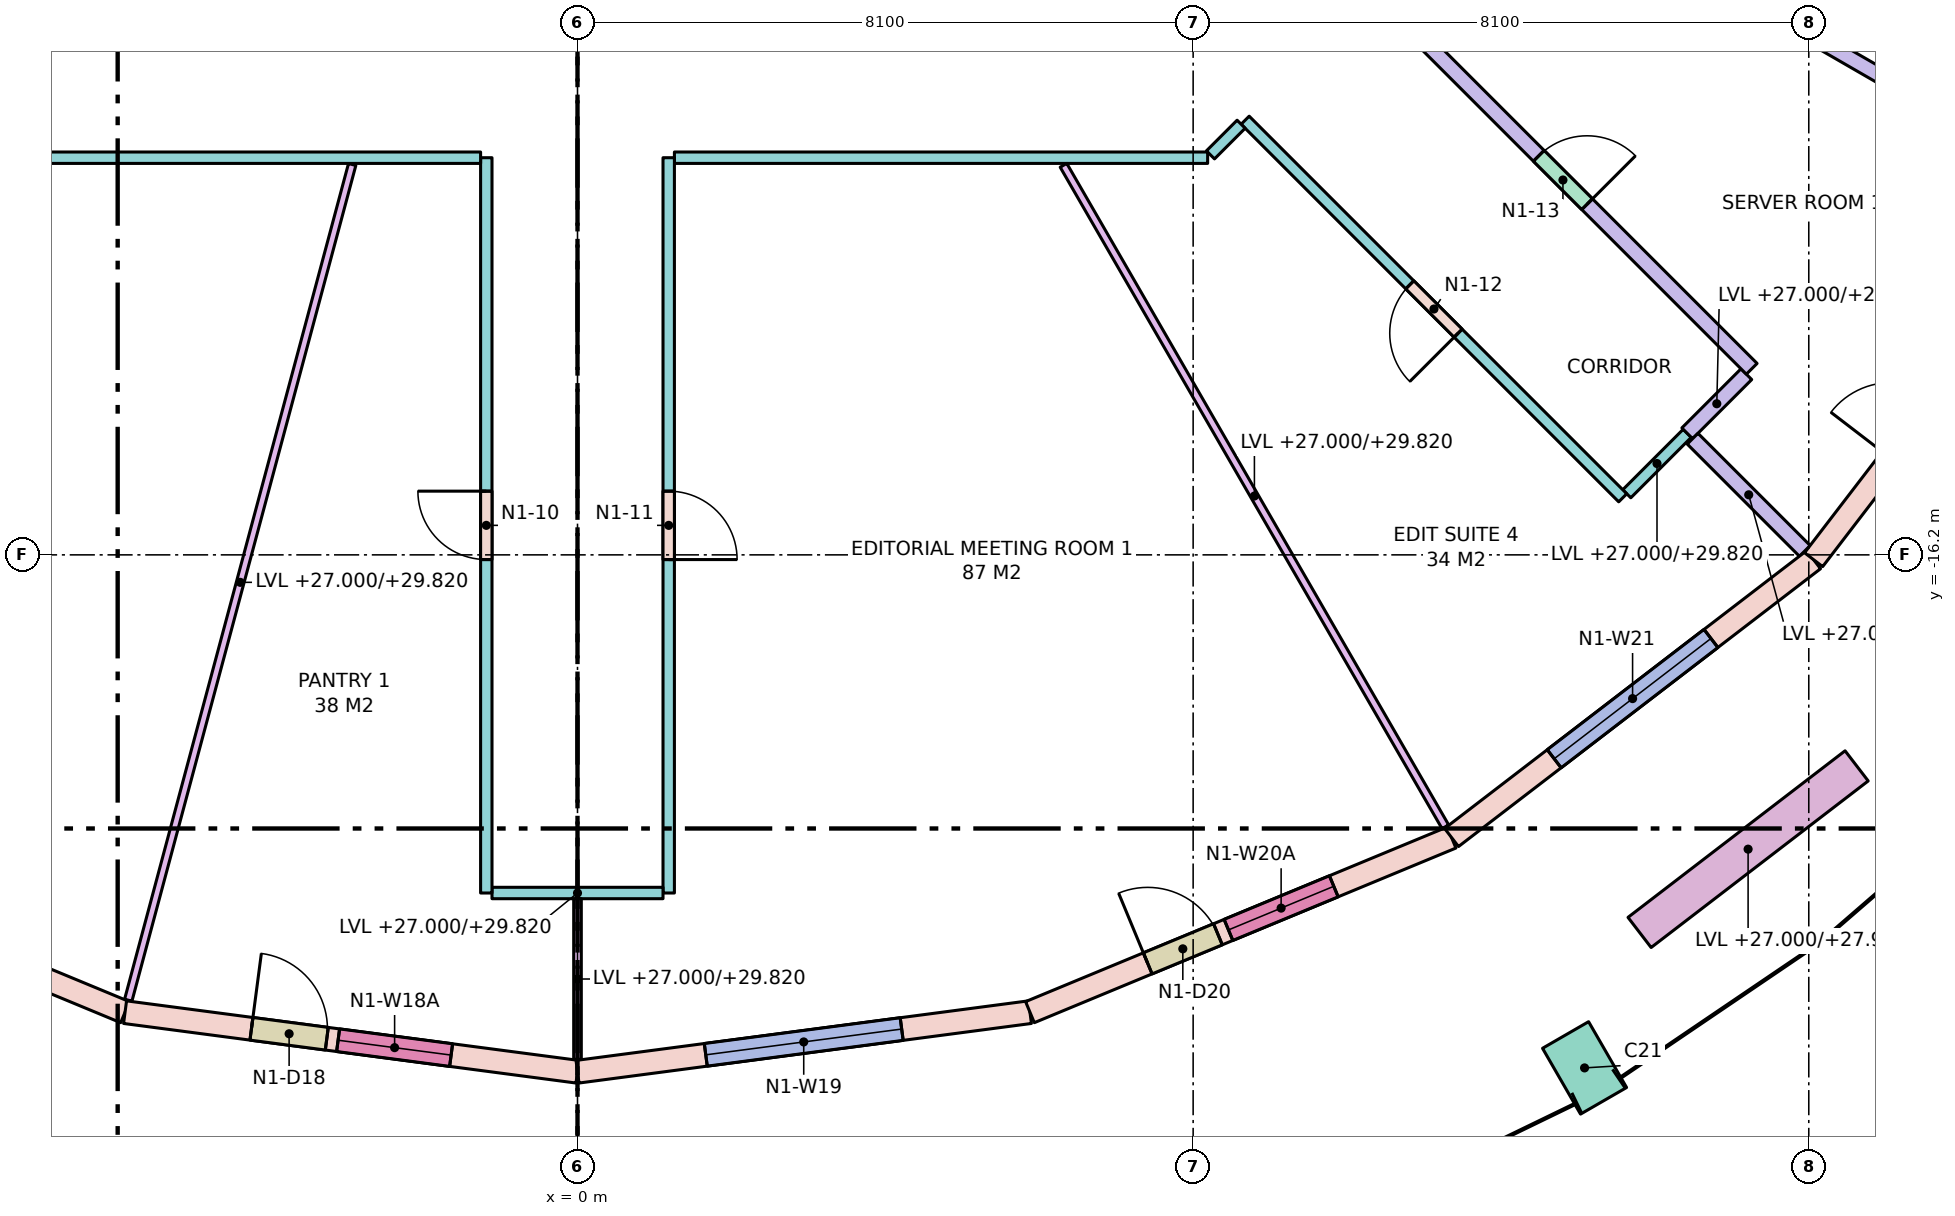
"""IFC4 building model, lengths in metres.
Left out: names, types, materials, properties, quantities, classifications, styles, units other than length and angle.
Written with IfcOpenShell. Run it as: python <this file> out.ifc"""

import sys

from ifc_helpers import new_model, si_unit, direction, frame, frame_2d, origin, origin_2d, place, context, subcontext, project, spatial, rectangle, extrude, element, fill, save


model = new_model("IFC4")
c1 = context("Model", 3, precision=1e-05, world=origin(), true_north=direction((0.0, 1.0)))
c2 = subcontext(c1, "Body", "Model", "MODEL_VIEW")
j1 = project(units=[si_unit("LENGTHUNIT", "METRE"), si_unit("PLANEANGLEUNIT", "RADIAN")], contexts=[c1])
p1 = place(None, origin())
s1 = spatial("IfcSite", under=j1, at=p1, CompositionType="ELEMENT")
p2 = place(p1, origin())
s2 = spatial("IfcBuilding", under=s1, at=p2, CompositionType="ELEMENT")
p3 = place(p2, frame((0.0, 0.0, 27.0)))
s3 = spatial("IfcBuildingStorey", under=s2, at=p3, CompositionType="ELEMENT", Elevation=27.0)
p4 = place(p3, frame((13.25, -22.95, 0.0), z_axis=(0.0, 0.0, 1.0), x_axis=(0.866025403784, 0.5, 0.0)))
e1 = element("IfcColumn", 1, at=p4, inside=s3, PredefinedType="COLUMN", context=c2, shape_type="SweptSolid", body=[
    extrude(rectangle(XDim=0.7, YDim=1.0, at=origin_2d()), origin(), (0.0, 0.0, 1.0), 4.0),
])
p5 = place(p3, frame((-11.5, -19.919, 0.0), z_axis=(0.0, 0.0, 1.0), x_axis=(0.923884511653, -0.382671411433, 0.0)))
e2 = element("IfcWall", 2, at=p5, inside=s3, PredefinedType="STANDARD", context=c2, shape_type="SweptSolid", body=[
    extrude(rectangle(XDim=6.004, YDim=0.3, at=frame_2d((3.002, 0.0))), origin(), (0.0, 0.0, 1.0), 3.72),
])
p6 = place(p5, frame((1.702, 0.0, 0.8)))
e3 = element("IfcOpeningElement", 3, at=p6, cuts=e2, PredefinedType="OPENING", context=c2, shape_type="SweptSolid", body=[
    extrude(rectangle(XDim=2.6, YDim=2.7, at=frame_2d((1.3, 1.35))), frame((0.0, 0.16, 0.0), z_axis=(0.0, -1.0, 0.0), x_axis=(1.0, 0.0, 0.0)), (0.0, 0.0, 1.0), 0.32),
])
p7 = place(p3, frame((-5.953, -22.216, 0.0), z_axis=(0.0, 0.0, 1.0), x_axis=(0.991445297315, -0.130522880875, 0.0)))
e4 = element("IfcWall", 4, at=p7, inside=s3, PredefinedType="STANDARD", context=c2, shape_type="SweptSolid", body=[
    extrude(rectangle(XDim=6.004, YDim=0.3, at=frame_2d((3.002, 0.0))), origin(), (0.0, 0.0, 1.0), 3.72),
])
p8 = place(p7, frame((1.677, 0.0, 0.0)))
e5 = element("IfcOpeningElement", 5, at=p8, cuts=e4, PredefinedType="OPENING", context=c2, shape_type="SweptSolid", body=[
    extrude(rectangle(XDim=1.0, YDim=2.4, at=frame_2d((0.5, 1.2))), frame((0.0, 0.16, 0.0), z_axis=(0.0, -1.0, 0.0), x_axis=(1.0, 0.0, 0.0)), (0.0, 0.0, 1.0), 0.32),
])
p9 = place(p7, frame((2.827, 0.0, 0.8)))
e6 = element("IfcOpeningElement", 6, at=p9, cuts=e4, PredefinedType="OPENING", context=c2, shape_type="SweptSolid", body=[
    extrude(rectangle(XDim=1.5, YDim=2.7, at=frame_2d((0.75, 1.35))), frame((0.0, 0.16, 0.0), z_axis=(0.0, -1.0, 0.0), x_axis=(1.0, 0.0, 0.0)), (0.0, 0.0, 1.0), 0.32),
])
p10 = place(p3, frame((0.0, -23.0, 0.0), z_axis=(0.0, 0.0, 1.0), x_axis=(0.991445297315, 0.130522880875, 0.0)))
e7 = element("IfcWall", 7, at=p10, inside=s3, PredefinedType="STANDARD", context=c2, shape_type="SweptSolid", body=[
    extrude(rectangle(XDim=6.004, YDim=0.3, at=frame_2d((3.002, 0.0))), origin(), (0.0, 0.0, 1.0), 3.72),
])
p11 = place(p10, frame((1.702, 0.0, 0.8)))
e8 = element("IfcOpeningElement", 8, at=p11, cuts=e7, PredefinedType="OPENING", context=c2, shape_type="SweptSolid", body=[
    extrude(rectangle(XDim=2.6, YDim=2.7, at=frame_2d((1.3, 1.35))), frame((0.0, 0.16, 0.0), z_axis=(0.0, -1.0, 0.0), x_axis=(1.0, 0.0, 0.0)), (0.0, 0.0, 1.0), 0.32),
])
p12 = place(p3, frame((5.953, -22.216, 0.0), z_axis=(0.0, 0.0, 1.0), x_axis=(0.923884511653, 0.382671411433, 0.0)))
e9 = element("IfcWall", 9, at=p12, inside=s3, PredefinedType="STANDARD", context=c2, shape_type="SweptSolid", body=[
    extrude(rectangle(XDim=6.004, YDim=0.3, at=frame_2d((3.002, 0.0))), origin(), (0.0, 0.0, 1.0), 3.72),
])
p13 = place(p12, frame((1.677, 0.0, 0.0)))
e10 = element("IfcOpeningElement", 10, at=p13, cuts=e9, PredefinedType="OPENING", context=c2, shape_type="SweptSolid", body=[
    extrude(rectangle(XDim=1.0, YDim=2.4, at=frame_2d((0.5, 1.2))), frame((0.0, 0.16, 0.0), z_axis=(0.0, -1.0, 0.0), x_axis=(1.0, 0.0, 0.0)), (0.0, 0.0, 1.0), 0.32),
])
p14 = place(p12, frame((2.827, 0.0, 0.8)))
e11 = element("IfcOpeningElement", 11, at=p14, cuts=e9, PredefinedType="OPENING", context=c2, shape_type="SweptSolid", body=[
    extrude(rectangle(XDim=1.5, YDim=2.7, at=frame_2d((0.75, 1.35))), frame((0.0, 0.16, 0.0), z_axis=(0.0, -1.0, 0.0), x_axis=(1.0, 0.0, 0.0)), (0.0, 0.0, 1.0), 0.32),
])
p15 = place(p3, frame((11.5, -19.919, 0.0), z_axis=(0.0, 0.0, 1.0), x_axis=(0.793339924758, 0.608778912074, 0.0)))
e12 = element("IfcWall", 12, at=p15, inside=s3, PredefinedType="STANDARD", context=c2, shape_type="SweptSolid", body=[
    extrude(rectangle(XDim=6.004, YDim=0.3, at=frame_2d((3.002, 0.0))), origin(), (0.0, 0.0, 1.0), 3.72),
])
p16 = place(p15, frame((1.702, 0.0, 0.8)))
e13 = element("IfcOpeningElement", 13, at=p16, cuts=e12, PredefinedType="OPENING", context=c2, shape_type="SweptSolid", body=[
    extrude(rectangle(XDim=2.6, YDim=2.7, at=frame_2d((1.3, 1.35))), frame((0.0, 0.16, 0.0), z_axis=(0.0, -1.0, 0.0), x_axis=(1.0, 0.0, 0.0)), (0.0, 0.0, 1.0), 0.32),
])
p17 = place(p3, frame((16.263, -16.263, 0.0), z_axis=(0.0, 0.0, 1.0), x_axis=(0.608778912074, 0.793339924758, 0.0)))
e14 = element("IfcWall", 14, at=p17, inside=s3, PredefinedType="STANDARD", context=c2, shape_type="SweptSolid", body=[
    extrude(rectangle(XDim=6.004, YDim=0.3, at=frame_2d((3.002, 0.0))), origin(), (0.0, 0.0, 1.0), 3.72),
])
p18 = place(p17, frame((1.677, 0.0, 0.0)))
e15 = element("IfcOpeningElement", 15, at=p18, cuts=e14, PredefinedType="OPENING", context=c2, shape_type="SweptSolid", body=[
    extrude(rectangle(XDim=1.0, YDim=2.4, at=frame_2d((0.5, 1.2))), frame((0.0, 0.16, 0.0), z_axis=(0.0, -1.0, 0.0), x_axis=(1.0, 0.0, 0.0)), (0.0, 0.0, 1.0), 0.32),
])
p19 = place(p17, frame((2.827, 0.0, 0.8)))
e16 = element("IfcOpeningElement", 16, at=p19, cuts=e14, PredefinedType="OPENING", context=c2, shape_type="SweptSolid", body=[
    extrude(rectangle(XDim=1.5, YDim=2.7, at=frame_2d((0.75, 1.35))), frame((0.0, 0.16, 0.0), z_axis=(0.0, -1.0, 0.0), x_axis=(1.0, 0.0, 0.0)), (0.0, 0.0, 1.0), 0.32),
])
p20 = place(p3, frame((13.974, -21.167, 0.0), z_axis=(0.0, 0.0, 1.0), x_axis=(0.793359599829, 0.608753271334, 0.0)))
e17 = element("IfcWall", 17, at=p20, inside=s3, PredefinedType="PARAPET", context=c2, shape_type="SweptSolid", body=[
    extrude(rectangle(XDim=3.6, YDim=0.5, at=frame_2d((1.8, 0.0))), origin(), (0.0, 0.0, 1.0), 0.9),
])
p21 = place(p3, frame((15.379, -13.823, 0.0), z_axis=(0.0, 0.0, 1.0), x_axis=(-0.707106781187, -0.707106781187, 0.0)))
e18 = element("IfcWall", 18, at=p21, inside=s3, PredefinedType="PARTITIONING", context=c2, shape_type="SweptSolid", body=[
    extrude(rectangle(XDim=1.1, YDim=0.2, at=frame_2d((0.55, 0.0))), origin(), (0.0, 0.0, 1.0), 2.82),
])
p22 = place(p3, frame((14.601, -14.601, 0.0), z_axis=(0.0, 0.0, 1.0), x_axis=(-0.707106781187, -0.707106781187, 0.0)))
e19 = element("IfcWall", 19, at=p22, inside=s3, PredefinedType="PARTITIONING", context=c2, shape_type="SweptSolid", body=[
    extrude(rectangle(XDim=1.125, YDim=0.15, at=frame_2d((0.562, 0.0))), origin(), (0.0, 0.0, 1.0), 2.82),
])
p23 = place(p3, frame((13.752, -15.449, 0.0), z_axis=(0.0, 0.0, 1.0), x_axis=(-0.707089406061, 0.707124155885, 0.0)))
e20 = element("IfcWall", 20, at=p23, inside=s3, PredefinedType="PARTITIONING", context=c2, shape_type="SweptSolid", body=[
    extrude(rectangle(XDim=7.026, YDim=0.15, at=frame_2d((3.513, 0.0))), origin(), (0.0, 0.0, 1.0), 3.72),
])
p24 = place(p23, frame((3.063, 0.0, 0.0)))
e21 = element("IfcOpeningElement", 21, at=p24, cuts=e20, PredefinedType="OPENING", context=c2, shape_type="SweptSolid", body=[
    extrude(rectangle(XDim=0.9, YDim=2.1, at=frame_2d((0.45, 1.05))), frame((0.0, 0.085, 0.0), z_axis=(0.0, -1.0, 0.0), x_axis=(1.0, 0.0, 0.0)), (0.0, 0.0, 1.0), 0.17),
])
p25 = place(p3, frame((8.731, -10.534, 0.0), z_axis=(0.0, 0.0, 1.0), x_axis=(-0.707106781187, -0.707106781187, 0.0)))
e22 = element("IfcWall", 22, at=p25, inside=s3, PredefinedType="PARTITIONING", context=c2, shape_type="SweptSolid", body=[
    extrude(rectangle(XDim=0.571, YDim=0.15, at=frame_2d((0.285, 0.0))), origin(), (0.0, 0.0, 1.0), 3.72),
])
p26 = place(p3, frame((8.291, -10.975, 0.0), z_axis=(0.0, 0.0, 1.0), x_axis=(-1.0, 0.0, 0.0)))
e23 = element("IfcWall", 23, at=p26, inside=s3, PredefinedType="PARTITIONING", context=c2, shape_type="SweptSolid", body=[
    extrude(rectangle(XDim=7.016, YDim=0.15, at=frame_2d((3.508, 0.0))), origin(), (0.0, 0.0, 1.0), 2.82),
])
p27 = place(p3, frame((1.2, -10.975, 0.0), z_axis=(0.0, 0.0, 1.0), x_axis=(0.0, -1.0, 0.0)))
e24 = element("IfcWall", 24, at=p27, inside=s3, PredefinedType="PARTITIONING", context=c2, shape_type="SweptSolid", body=[
    extrude(rectangle(XDim=9.674, YDim=0.15, at=frame_2d((4.837, 0.0))), origin(), (0.0, 0.0, 1.0), 3.72),
])
p28 = place(p27, frame((4.387, 0.0, 0.0)))
e25 = element("IfcOpeningElement", 25, at=p28, cuts=e24, PredefinedType="OPENING", context=c2, shape_type="SweptSolid", body=[
    extrude(rectangle(XDim=0.9, YDim=2.1, at=frame_2d((0.45, 1.05))), frame((0.0, 0.085, 0.0), z_axis=(0.0, -1.0, 0.0), x_axis=(1.0, 0.0, 0.0)), (0.0, 0.0, 1.0), 0.17),
])
p29 = place(p3, frame((1.125, -20.649, 0.0), z_axis=(0.0, 0.0, 1.0), x_axis=(-1.0, 0.0, 0.0)))
e26 = element("IfcWall", 26, at=p29, inside=s3, PredefinedType="PARTITIONING", context=c2, shape_type="SweptSolid", body=[
    extrude(rectangle(XDim=2.25, YDim=0.15, at=frame_2d((1.125, 0.0))), origin(), (0.0, 0.0, 1.0), 2.82),
])
p30 = place(p3, frame((-1.2, -20.649, 0.0), z_axis=(0.0, 0.0, 1.0), x_axis=(0.0, 1.0, 0.0)))
e27 = element("IfcWall", 27, at=p30, inside=s3, PredefinedType="PARTITIONING", context=c2, shape_type="SweptSolid", body=[
    extrude(rectangle(XDim=9.674, YDim=0.15, at=frame_2d((4.837, 0.0))), origin(), (0.0, 0.0, 1.0), 3.72),
])
p31 = place(p30, frame((4.387, 0.0, 0.0)))
e28 = element("IfcOpeningElement", 28, at=p31, cuts=e27, PredefinedType="OPENING", context=c2, shape_type="SweptSolid", body=[
    extrude(rectangle(XDim=0.9, YDim=2.1, at=frame_2d((0.45, 1.05))), frame((0.0, 0.085, 0.0), z_axis=(0.0, -1.0, 0.0), x_axis=(1.0, 0.0, 0.0)), (0.0, 0.0, 1.0), 0.17),
])
p32 = place(p3, frame((-1.275, -10.975, 0.0), z_axis=(0.0, 0.0, 1.0), x_axis=(-1.0, 0.0, 0.0)))
e29 = element("IfcWall", 29, at=p32, inside=s3, PredefinedType="PARTITIONING", context=c2, shape_type="SweptSolid", body=[
    extrude(rectangle(XDim=7.016, YDim=0.15, at=frame_2d((3.508, 0.0))), origin(), (0.0, 0.0, 1.0), 2.82),
])
p33 = place(p3, frame((10.481, -8.784, 0.0), z_axis=(0.0, 0.0, 1.0), x_axis=(0.707124155885, -0.707089406061, 0.0)))
e30 = element("IfcWall", 30, at=p33, inside=s3, PredefinedType="PARTITIONING", context=c2, shape_type="SweptSolid", body=[
    extrude(rectangle(XDim=7.026, YDim=0.2, at=frame_2d((3.513, 0.0))), origin(), (0.0, 0.0, 1.0), 3.72),
])
p34 = place(p33, frame((3.063, 0.0, 0.0)))
e31 = element("IfcOpeningElement", 31, at=p34, cuts=e30, PredefinedType="OPENING", context=c2, shape_type="SweptSolid", body=[
    extrude(rectangle(XDim=0.9, YDim=2.1, at=frame_2d((0.45, 1.05))), frame((0.0, 0.11, 0.0), z_axis=(0.0, -1.0, 0.0), x_axis=(1.0, 0.0, 0.0)), (0.0, 0.0, 1.0), 0.22),
])
p35 = place(p3, frame((-2.965, -11.064, 0.0), z_axis=(0.0, 0.0, 1.0), x_axis=(-0.258827930947, -0.965923445291, 0.0)))
e32 = element("IfcWall", 32, at=p35, inside=s3, PredefinedType="PARTITIONING", context=c2, shape_type="SweptSolid", body=[
    extrude(rectangle(XDim=11.382, YDim=0.1, at=frame_2d((5.691, 0.0))), origin(), (0.0, 0.0, 1.0), 2.82),
])
p36 = place(p3, frame((0.0, -20.724, 0.0), z_axis=(0.0, 0.0, 1.0), x_axis=(0.0, -1.0, 0.0)))
e33 = element("IfcWall", 33, at=p36, inside=s3, PredefinedType="PARTITIONING", context=c2, shape_type="SweptSolid", body=[
    extrude(rectangle(XDim=2.113, YDim=0.1, at=frame_2d((1.057, 0.0))), origin(), (0.0, 0.0, 1.0), 2.82),
])
p37 = place(p3, frame((6.394, -11.075, 0.0), z_axis=(0.0, 0.0, 1.0), x_axis=(0.500024592647, -0.866011204747, 0.0)))
e34 = element("IfcWall", 34, at=p37, inside=s3, PredefinedType="PARTITIONING", context=c2, shape_type="SweptSolid", body=[
    extrude(rectangle(XDim=10.049, YDim=0.1, at=frame_2d((5.024, 0.0))), origin(), (0.0, 0.0, 1.0), 2.82),
])
p38 = place(p3, frame((14.672, -14.672, 0.0), z_axis=(0.0, 0.0, 1.0), x_axis=(0.707106781187, -0.707106781187, 0.0)))
e35 = element("IfcWall", 35, at=p38, inside=s3, PredefinedType="PARTITIONING", context=c2, shape_type="SweptSolid", body=[
    extrude(rectangle(XDim=2.088, YDim=0.2, at=frame_2d((1.044, 0.0))), origin(), (0.0, 0.0, 1.0), 2.82),
])
p39 = place(p3, frame((12.305, -7.104, 0.0), z_axis=(0.0, 0.0, 1.0), x_axis=(0.866017835858, -0.500013107804, 0.0)))
e36 = element("IfcWall", 36, at=p39, inside=s3, PredefinedType="PARTITIONING", context=c2, shape_type="SweptSolid", body=[
    extrude(rectangle(XDim=8.628, YDim=0.2, at=frame_2d((4.314, 0.0))), origin(), (0.0, 0.0, 1.0), 2.82),
])
p40 = place(p8, origin())
e37 = element("IfcDoor", 37, at=p40, inside=s3, OperationType="SINGLE_SWING_LEFT", PredefinedType="DOOR", context=c2, shape_type="SweptSolid", body=[
    extrude(rectangle(XDim=1.0, YDim=2.4, at=frame_2d((0.5, 1.2))), frame((0.0, 0.025, 0.0), z_axis=(0.0, -1.0, 0.0), x_axis=(1.0, 0.0, 0.0)), (0.0, 0.0, 1.0), 0.05),
])
fill(e5, e37)
p41 = place(p9, origin())
e38 = element("IfcWindow", 38, at=p41, inside=s3, PartitioningType="SINGLE_PANEL", PredefinedType="WINDOW", context=c2, shape_type="SweptSolid", body=[
    extrude(rectangle(XDim=1.5, YDim=2.7, at=frame_2d((0.75, 1.35))), frame((0.0, 0.03, 0.0), z_axis=(0.0, -1.0, 0.0), x_axis=(1.0, 0.0, 0.0)), (0.0, 0.0, 1.0), 0.06),
])
fill(e6, e38)
p42 = place(p11, origin())
e39 = element("IfcWindow", 39, at=p42, inside=s3, PartitioningType="SINGLE_PANEL", PredefinedType="WINDOW", context=c2, shape_type="SweptSolid", body=[
    extrude(rectangle(XDim=2.6, YDim=2.7, at=frame_2d((1.3, 1.35))), frame((0.0, 0.03, 0.0), z_axis=(0.0, -1.0, 0.0), x_axis=(1.0, 0.0, 0.0)), (0.0, 0.0, 1.0), 0.06),
])
fill(e8, e39)
p43 = place(p13, origin())
e40 = element("IfcDoor", 40, at=p43, inside=s3, OperationType="SINGLE_SWING_LEFT", PredefinedType="DOOR", context=c2, shape_type="SweptSolid", body=[
    extrude(rectangle(XDim=1.0, YDim=2.4, at=frame_2d((0.5, 1.2))), frame((0.0, 0.025, 0.0), z_axis=(0.0, -1.0, 0.0), x_axis=(1.0, 0.0, 0.0)), (0.0, 0.0, 1.0), 0.05),
])
fill(e10, e40)
p44 = place(p14, origin())
e41 = element("IfcWindow", 41, at=p44, inside=s3, PartitioningType="SINGLE_PANEL", PredefinedType="WINDOW", context=c2, shape_type="SweptSolid", body=[
    extrude(rectangle(XDim=1.5, YDim=2.7, at=frame_2d((0.75, 1.35))), frame((0.0, 0.03, 0.0), z_axis=(0.0, -1.0, 0.0), x_axis=(1.0, 0.0, 0.0)), (0.0, 0.0, 1.0), 0.06),
])
fill(e11, e41)
p45 = place(p16, origin())
e42 = element("IfcWindow", 42, at=p45, inside=s3, PartitioningType="SINGLE_PANEL", PredefinedType="WINDOW", context=c2, shape_type="SweptSolid", body=[
    extrude(rectangle(XDim=2.6, YDim=2.7, at=frame_2d((1.3, 1.35))), frame((0.0, 0.03, 0.0), z_axis=(0.0, -1.0, 0.0), x_axis=(1.0, 0.0, 0.0)), (0.0, 0.0, 1.0), 0.06),
])
fill(e13, e42)
p46 = place(p31, origin())
e43 = element("IfcDoor", 43, at=p46, inside=s3, OperationType="SINGLE_SWING_RIGHT", PredefinedType="DOOR", context=c2, shape_type="SweptSolid", body=[
    extrude(rectangle(XDim=0.9, YDim=2.1, at=frame_2d((0.45, 1.05))), frame((0.0, 0.025, 0.0), z_axis=(0.0, -1.0, 0.0), x_axis=(1.0, 0.0, 0.0)), (0.0, 0.0, 1.0), 0.05),
])
fill(e28, e43)
p47 = place(p28, origin())
e44 = element("IfcDoor", 44, at=p47, inside=s3, OperationType="SINGLE_SWING_RIGHT", PredefinedType="DOOR", context=c2, shape_type="SweptSolid", body=[
    extrude(rectangle(XDim=0.9, YDim=2.1, at=frame_2d((0.45, 1.05))), frame((0.0, 0.025, 0.0), z_axis=(0.0, -1.0, 0.0), x_axis=(1.0, 0.0, 0.0)), (0.0, 0.0, 1.0), 0.05),
])
fill(e25, e44)
p48 = place(p24, origin())
e45 = element("IfcDoor", 45, at=p48, inside=s3, OperationType="SINGLE_SWING_LEFT", PredefinedType="DOOR", context=c2, shape_type="SweptSolid", body=[
    extrude(rectangle(XDim=0.9, YDim=2.1, at=frame_2d((0.45, 1.05))), frame((0.0, 0.025, 0.0), z_axis=(0.0, -1.0, 0.0), x_axis=(1.0, 0.0, 0.0)), (0.0, 0.0, 1.0), 0.05),
])
fill(e21, e45)
p49 = place(p34, origin())
e46 = element("IfcDoor", 46, at=p49, inside=s3, OperationType="SINGLE_SWING_RIGHT", PredefinedType="DOOR", context=c2, shape_type="SweptSolid", body=[
    extrude(rectangle(XDim=0.9, YDim=2.1, at=frame_2d((0.45, 1.05))), frame((0.0, 0.025, 0.0), z_axis=(0.0, -1.0, 0.0), x_axis=(1.0, 0.0, 0.0)), (0.0, 0.0, 1.0), 0.05),
])
fill(e31, e46)
save(model, sys.argv[1])
